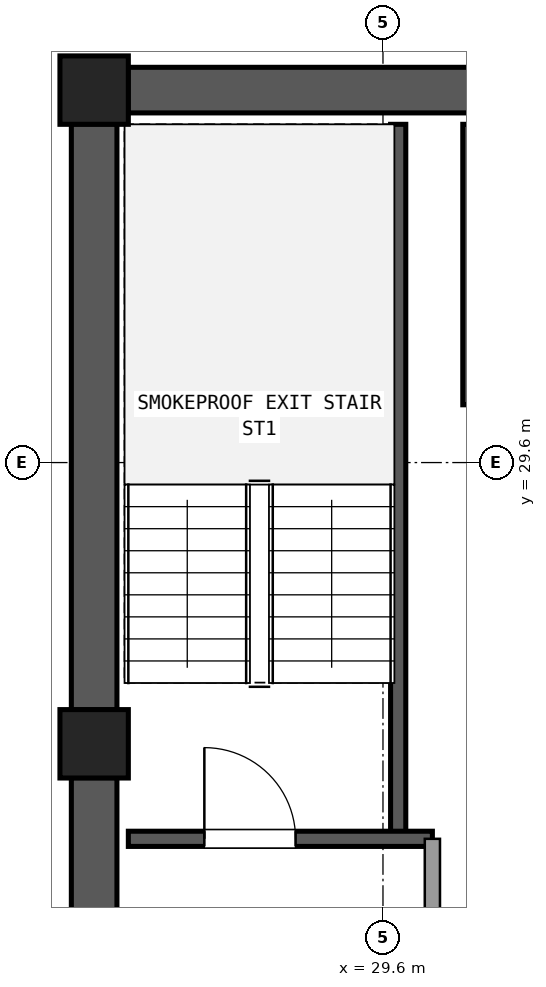
"""IFC4 building model, lengths in metres.
Left out: names, types, materials, properties, quantities, classifications, styles, units other than length and angle.
Written with IfcOpenShell. Run it as: python <this file> out.ifc"""

import sys

from ifc_helpers import new_model, si_unit, direction, frame, frame_2d, origin, origin_2d, place, context, subcontext, project, spatial, rectangle, extrude, element, fill, save


model = new_model("IFC4")
c1 = context("Model", 3, precision=1e-05, world=origin(), true_north=direction((0.0, 1.0)))
c2 = subcontext(c1, "Body", "Model", "MODEL_VIEW")
j1 = project(units=[si_unit("LENGTHUNIT", "METRE"), si_unit("PLANEANGLEUNIT", "RADIAN")], contexts=[c1])
p1 = place(None, origin())
s1 = spatial("IfcSite", under=j1, at=p1, CompositionType="ELEMENT")
p2 = place(p1, origin())
s2 = spatial("IfcBuilding", under=s1, at=p2, CompositionType="ELEMENT")
p3 = place(p2, frame((0.0, 0.0, 221.58)))
s3 = spatial("IfcBuildingStorey", under=s2, at=p3, CompositionType="ELEMENT", Elevation=221.58)
for number, where, z_axis, x_axis in (
    (1, (25.8, 34.5, 0.0), (0.0, 0.0, 1.0), (1.0, 0.0, 0.0)),
    (2, (25.8, 25.9, 0.0), (0.0, 0.0, 1.0), (1.0, 0.0, 0.0)),
):
    element("IfcColumn", number, at=place(p3, frame(where, z_axis=z_axis, x_axis=x_axis)), inside=s3, PredefinedType="COLUMN", context=c2, shape_type="SweptSolid", body=[
        extrude(rectangle(XDim=0.9, YDim=0.9, at=origin_2d()), origin(), (0.0, 0.0, 1.0), 3.6),
    ])
p4 = place(p3, frame((36.555, 34.5, 0.0), z_axis=(0.0, 0.0, 1.0), x_axis=(-1.0, 0.0, 0.0)))
e3 = element("IfcWall", 3, at=p4, inside=s3, PredefinedType="SHEAR", context=c2, shape_type="SweptSolid", body=[
    extrude(rectangle(XDim=10.31, YDim=0.6, at=frame_2d((5.155, 0.0))), origin(), (0.0, 0.0, 1.0), 3.32),
])
p5 = place(p4, frame((4.155, 0.0, 0.0)))
e4 = element("IfcOpeningElement", 4, at=p5, cuts=e3, PredefinedType="OPENING", context=c2, shape_type="SweptSolid", body=[
    extrude(rectangle(XDim=1.2, YDim=2.15, at=frame_2d((0.6, 1.075))), frame((0.0, 0.31, 0.0), z_axis=(0.0, -1.0, 0.0), x_axis=(1.0, 0.0, 0.0)), (0.0, 0.0, 1.0), 0.62),
])
p6 = place(p3, frame((25.8, 34.055, 0.0), z_axis=(0.0, 0.0, 1.0), x_axis=(0.0, -1.0, 0.0)))
e5 = element("IfcWall", 5, at=p6, inside=s3, PredefinedType="SHEAR", context=c2, shape_type="SweptSolid", body=[
    extrude(rectangle(XDim=7.71, YDim=0.6, at=frame_2d((3.855, 0.0))), origin(), (0.0, 0.0, 1.0), 3.32),
])
p7 = place(p3, frame((25.8, 25.455, 0.0), z_axis=(0.0, 0.0, 1.0), x_axis=(0.0, -1.0, 0.0)))
e6 = element("IfcWall", 6, at=p7, inside=s3, PredefinedType="SHEAR", context=c2, shape_type="SweptSolid", body=[
    extrude(rectangle(XDim=7.71, YDim=0.6, at=frame_2d((3.855, 0.0))), origin(), (0.0, 0.0, 1.0), 3.32),
])
p8 = place(p7, frame((2.205, 0.0, 0.0)))
e7 = element("IfcOpeningElement", 7, at=p8, cuts=e6, PredefinedType="OPENING", context=c2, shape_type="SweptSolid", body=[
    extrude(rectangle(XDim=1.2, YDim=2.15, at=frame_2d((0.6, 1.075))), frame((0.0, 0.31, 0.0), z_axis=(0.0, -1.0, 0.0), x_axis=(1.0, 0.0, 0.0)), (0.0, 0.0, 1.0), 0.62),
])
p9 = place(p3, frame((29.8, 24.65, 0.0), z_axis=(0.0, 0.0, 1.0), x_axis=(0.0, 1.0, 0.0)))
e8 = element("IfcWall", 8, at=p9, inside=s3, PredefinedType="SHEAR", context=c2, shape_type="SweptSolid", body=[
    extrude(rectangle(XDim=9.4, YDim=0.2, at=frame_2d((4.7, 0.0))), origin(), (0.0, 0.0, 1.0), 3.32),
])
p10 = place(p3, frame((26.25, 24.65, 0.0), z_axis=(0.0, 0.0, 1.0), x_axis=(1.0, 0.0, 0.0)))
e9 = element("IfcWall", 9, at=p10, inside=s3, PredefinedType="SHEAR", context=c2, shape_type="SweptSolid", body=[
    extrude(rectangle(XDim=4.0, YDim=0.2, at=frame_2d((2.0, 0.0))), origin(), (0.0, 0.0, 1.0), 3.32),
])
p11 = place(p10, frame((1.0, 0.0, 0.0)))
e10 = element("IfcOpeningElement", 10, at=p11, cuts=e9, PredefinedType="OPENING", context=c2, shape_type="SweptSolid", body=[
    extrude(rectangle(XDim=1.2, YDim=2.15, at=frame_2d((0.6, 1.075))), frame((0.0, 0.11, 0.0), z_axis=(0.0, -1.0, 0.0), x_axis=(1.0, 0.0, 0.0)), (0.0, 0.0, 1.0), 0.22),
])
p12 = place(p3, frame((30.75, 30.36, 0.0), z_axis=(0.0, 0.0, 1.0), x_axis=(0.0, 1.0, 0.0)))
e11 = element("IfcWall", 11, at=p12, inside=s3, PredefinedType="SHEAR", context=c2, shape_type="SweptSolid", body=[
    extrude(rectangle(XDim=3.69, YDim=0.2, at=frame_2d((1.845, 0.0))), origin(), (0.0, 0.0, 1.0), 3.32),
])
p13 = place(p3, frame((30.25, 17.75, 0.0), z_axis=(0.0, 0.0, 1.0), x_axis=(0.0, 1.0, 0.0)))
e12 = element("IfcWall", 12, at=p13, inside=s3, PredefinedType="SOLIDWALL", context=c2, shape_type="SweptSolid", body=[
    extrude(rectangle(XDim=6.9, YDim=0.2, at=frame_2d((3.45, 0.0))), origin(), (0.0, 0.0, 1.0), 2.61),
])
p14 = place(p13, frame((4.15, 0.0, 0.0)))
e13 = element("IfcOpeningElement", 13, at=p14, cuts=e12, PredefinedType="OPENING", context=c2, shape_type="SweptSolid", body=[
    extrude(rectangle(XDim=1.2, YDim=2.15, at=frame_2d((0.6, 1.075))), frame((0.0, 0.11, 0.0), z_axis=(0.0, -1.0, 0.0), x_axis=(1.0, 0.0, 0.0)), (0.0, 0.0, 1.0), 0.22),
])
p15 = place(p11, origin())
e14 = element("IfcDoor", 14, at=p15, inside=s3, OperationType="SINGLE_SWING_LEFT", PredefinedType="DOOR", context=c2, shape_type="SweptSolid", body=[
    extrude(rectangle(XDim=1.2, YDim=2.15, at=frame_2d((0.6, 1.075))), frame((0.0, 0.025, 0.0), z_axis=(0.0, -1.0, 0.0), x_axis=(1.0, 0.0, 0.0)), (0.0, 0.0, 1.0), 0.05),
])
fill(e10, e14)
save(model, sys.argv[1])
